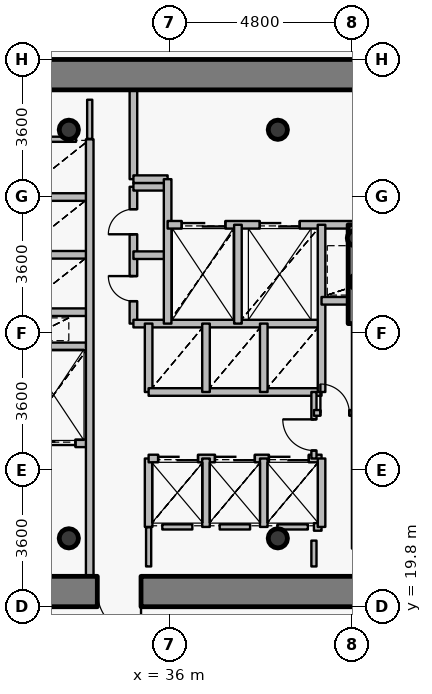
"""IFC4 building model, lengths in metres.
Left out: names, types, materials, properties, quantities, classifications, styles, units other than length and angle.
Written with IfcOpenShell. Run it as: python <this file> out.ifc"""

import sys

from ifc_helpers import new_model, si_unit, direction, frame, frame_2d, origin, origin_2d, place, context, subcontext, project, spatial, rectangle, hollow_circle, extrude, source, transform, mapped, element, fill, save


model = new_model("IFC4")
c1 = context("Model", 3, precision=1e-05, world=origin(), true_north=direction((0.0, 1.0)))
c2 = subcontext(c1, "Body", "Model", "MODEL_VIEW")
j1 = project(units=[si_unit("LENGTHUNIT", "METRE"), si_unit("PLANEANGLEUNIT", "RADIAN")], contexts=[c1])
p1 = place(None, origin())
s1 = spatial("IfcSite", under=j1, at=p1, CompositionType="ELEMENT")
p2 = place(p1, origin())
s2 = spatial("IfcBuilding", under=s1, at=p2, CompositionType="ELEMENT")
p3 = place(p2, frame((0.0, 0.0, 100.95)))
s3 = spatial("IfcBuildingStorey", under=s2, at=p3, CompositionType="ELEMENT", Elevation=100.95)
for number, where, z_axis, x_axis in (
    (1, (33.35, 21.6, 0.0), (0.0, 0.0, 1.0), (1.0, 0.0, 0.0)),
    (2, (38.85, 21.6, 0.0), (0.0, 0.0, 1.0), (1.0, 0.0, 0.0)),
    (3, (38.85, 32.35, 0.0), (0.0, 0.0, 1.0), (1.0, 0.0, 0.0)),
    (4, (33.35, 32.35, 0.0), (0.0, 0.0, 1.0), (1.0, 0.0, 0.0)),
):
    element("IfcColumn", number, at=place(p3, frame(where, z_axis=z_axis, x_axis=x_axis)), inside=s3, PredefinedType="COLUMN", context=c2, shape_type="SweptSolid", body=[
        extrude(hollow_circle(Radius=0.254, WallThickness=0.02, at=origin_2d()), origin(), (0.0, 0.0, 1.0), 3.75),
    ])
for number, where, z_axis, x_axis in (
    (5, (40.95, 28.35, 0.0), (0.0, 0.0, 1.0), (1.0, 0.0, 0.0)),
    (6, (40.88, 29.5, 0.0), (0.0, 0.0, 1.0), (1.0, 0.0, 0.0)),
):
    element("IfcColumn", number, at=place(p3, frame(where, z_axis=z_axis, x_axis=x_axis)), inside=s3, PredefinedType="COLUMN", context=c2, shape_type="SweptSolid", body=[
        extrude(hollow_circle(Radius=0.203, WallThickness=0.016, at=origin_2d()), origin(), (0.0, 0.0, 1.0), 3.75),
    ])
p4 = place(p3, frame((26.6, 33.8, 0.0), z_axis=(0.0, 0.0, 1.0), x_axis=(1.0, 0.0, 0.0)))
e7 = element("IfcWall", 7, at=p4, inside=s3, PredefinedType="SHEAR", context=c2, shape_type="SweptSolid", body=[
    extrude(rectangle(XDim=18.8, YDim=0.8, at=frame_2d((9.4, 0.0))), origin(), (0.0, 0.0, 1.0), 2.95),
])
p5 = place(p3, frame((45.4, 20.2, 0.0), z_axis=(0.0, 0.0, 1.0), x_axis=(-1.0, 0.0, 0.0)))
e8 = element("IfcWall", 8, at=p5, inside=s3, PredefinedType="SHEAR", context=c2, shape_type="SweptSolid", body=[
    extrude(rectangle(XDim=18.8, YDim=0.8, at=frame_2d((9.4, 0.0))), origin(), (0.0, 0.0, 1.0), 2.95),
])
p6 = place(p5, frame((10.15, 0.0, 0.0)))
e9 = element("IfcOpeningElement", 9, at=p6, cuts=e8, PredefinedType="OPENING", context=c2, shape_type="SweptSolid", body=[
    extrude(rectangle(XDim=1.15, YDim=2.15, at=origin_2d()), frame((0.575, 0.41, 1.075), z_axis=(0.0, -1.0, 0.0), x_axis=(1.0, 0.0, 0.0)), (0.0, 0.0, 1.0), 0.82),
])
p7 = place(p3, frame((40.9, 27.25, 0.0), z_axis=(0.0, 0.0, 1.0), x_axis=(0.0, 1.0, 0.0)))
e10 = element("IfcWall", 10, at=p7, inside=s3, PredefinedType="SHEAR", context=c2, shape_type="SweptSolid", body=[
    extrude(rectangle(XDim=2.6, YDim=0.4, at=frame_2d((1.3, 0.0))), origin(), (0.0, 0.0, 1.0), 3.1),
])
p8 = place(p3, frame((32.0, 24.1, 0.0), z_axis=(0.0, 0.0, 1.0), x_axis=(1.0, 0.0, 0.0)))
e11 = element("IfcWall", 11, at=p8, inside=s3, PredefinedType="PARTITIONING", context=c2, shape_type="SweptSolid", body=[
    extrude(rectangle(XDim=1.9, YDim=0.2, at=frame_2d((0.95, 0.0))), origin(), (0.0, 0.0, 1.0), 3.085),
])
p9 = place(p8, frame((0.375, 0.0, 0.0)))
e12 = element("IfcOpeningElement", 12, at=p9, cuts=e11, PredefinedType="OPENING", context=c2, shape_type="SweptSolid", body=[
    extrude(rectangle(XDim=1.15, YDim=2.15, at=origin_2d()), frame((0.575, 0.11, 1.075), z_axis=(0.0, -1.0, 0.0), x_axis=(1.0, 0.0, 0.0)), (0.0, 0.0, 1.0), 0.22),
])
for number, where, z_axis, x_axis in (
    (13, (32.0, 26.65, 0.0), (0.0, 0.0, 1.0), (1.0, 0.0, 0.0)),
    (14, (32.0, 27.55, 0.0), (0.0, 0.0, 1.0), (1.0, 0.0, 0.0)),
    (15, (32.0, 29.06, 0.0), (0.0, 0.0, 1.0), (1.0, 0.0, 0.0)),
    (16, (32.0, 30.58, 0.0), (0.0, 0.0, 1.0), (1.0, 0.0, 0.0)),
):
    element("IfcWall", number, at=place(p3, frame(where, z_axis=z_axis, x_axis=x_axis)), inside=s3, PredefinedType="PARTITIONING", context=c2, shape_type="SweptSolid", body=[
        extrude(rectangle(XDim=1.9, YDim=0.2, at=frame_2d((0.95, 0.0))), origin(), (0.0, 0.0, 1.0), 3.085),
    ])
p10 = place(p3, frame((33.9, 20.6, 0.0), z_axis=(0.0, 0.0, 1.0), x_axis=(0.0, 1.0, 0.0)))
e17 = element("IfcWall", 17, at=p10, inside=s3, PredefinedType="PARTITIONING", context=c2, shape_type="SweptSolid", body=[
    extrude(rectangle(XDim=11.5, YDim=0.2, at=frame_2d((5.75, 0.0))), origin(), (0.0, 0.0, 1.0), 3.085),
])
p11 = place(p3, frame((35.05, 27.25, 0.0), z_axis=(0.0, 0.0, 1.0), x_axis=(0.0, 1.0, 0.0)))
e18 = element("IfcWall", 18, at=p11, inside=s3, PredefinedType="PARTITIONING", context=c2, shape_type="SweptSolid", body=[
    extrude(rectangle(XDim=3.6, YDim=0.2, at=frame_2d((1.8, 0.0))), origin(), (0.0, 0.0, 1.0), 3.5),
])
p12 = place(p11, frame((0.59, 0.0, 0.0)))
e19 = element("IfcOpeningElement", 19, at=p12, cuts=e18, PredefinedType="OPENING", context=c2, shape_type="SweptSolid", body=[
    extrude(rectangle(XDim=0.66, YDim=2.05, at=origin_2d()), frame((0.33, 0.11, 1.025), z_axis=(0.0, -1.0, 0.0), x_axis=(1.0, 0.0, 0.0)), (0.0, 0.0, 1.0), 0.22),
])
p13 = place(p11, frame((2.35, 0.0, 0.0)))
e20 = element("IfcOpeningElement", 20, at=p13, cuts=e18, PredefinedType="OPENING", context=c2, shape_type="SweptSolid", body=[
    extrude(rectangle(XDim=0.66, YDim=2.05, at=origin_2d()), frame((0.33, 0.11, 1.025), z_axis=(0.0, -1.0, 0.0), x_axis=(1.0, 0.0, 0.0)), (0.0, 0.0, 1.0), 0.22),
])
p14 = place(p3, frame((35.05, 27.25, 0.0), z_axis=(0.0, 0.0, 1.0), x_axis=(1.0, 0.0, 0.0)))
e21 = element("IfcWall", 21, at=p14, inside=s3, PredefinedType="PARTITIONING", context=c2, shape_type="SweptSolid", body=[
    extrude(rectangle(XDim=4.95, YDim=0.2, at=frame_2d((2.475, 0.0))), origin(), (0.0, 0.0, 1.0), 3.085),
])
for number, where, z_axis, x_axis in (
    (22, (35.05, 29.05, 0.0), (0.0, 0.0, 1.0), (1.0, 0.0, 0.0)),
    (23, (35.05, 30.85, 0.0), (0.0, 0.0, 1.0), (1.0, 0.0, 0.0)),
):
    element("IfcWall", number, at=place(p3, frame(where, z_axis=z_axis, x_axis=x_axis)), inside=s3, PredefinedType="PARTITIONING", context=c2, shape_type="SweptSolid", body=[
        extrude(rectangle(XDim=0.9, YDim=0.2, at=frame_2d((0.45, 0.0))), origin(), (0.0, 0.0, 1.0), 3.5),
    ])
p15 = place(p3, frame((35.05, 31.05, 0.0), z_axis=(0.0, 0.0, 1.0), x_axis=(0.0, 1.0, 0.0)))
e24 = element("IfcWall", 24, at=p15, inside=s3, PredefinedType="PARTITIONING", context=c2, shape_type="SweptSolid", body=[
    extrude(rectangle(XDim=2.35, YDim=0.2, at=frame_2d((1.175, 0.0))), origin(), (0.0, 0.0, 1.0), 3.085),
])
p16 = place(p3, frame((35.05, 31.05, 0.0), z_axis=(0.0, 0.0, 1.0), x_axis=(1.0, 0.0, 0.0)))
e25 = element("IfcWall", 25, at=p16, inside=s3, PredefinedType="PARTITIONING", context=c2, shape_type="SweptSolid", body=[
    extrude(rectangle(XDim=0.9, YDim=0.2, at=frame_2d((0.45, 0.0))), origin(), (0.0, 0.0, 1.0), 3.5),
])
p17 = place(p3, frame((35.45, 21.9, 0.0), z_axis=(0.0, 0.0, 1.0), x_axis=(0.0, 1.0, 0.0)))
e26 = element("IfcWall", 26, at=p17, inside=s3, PredefinedType="PARTITIONING", context=c2, shape_type="SweptSolid", body=[
    extrude(rectangle(XDim=1.8, YDim=0.2, at=frame_2d((0.9, 0.0))), origin(), (0.0, 0.0, 1.0), 3.5),
])
p18 = place(p3, frame((35.45, 23.7, 0.0), z_axis=(0.0, 0.0, 1.0), x_axis=(1.0, 0.0, 0.0)))
e27 = element("IfcWall", 27, at=p18, inside=s3, PredefinedType="PARTITIONING", context=c2, shape_type="SweptSolid", body=[
    extrude(rectangle(XDim=4.55, YDim=0.2, at=frame_2d((2.275, 0.0))), origin(), (0.0, 0.0, 1.0), 3.085),
])
p19 = place(p18, frame((0.25, 0.0, 0.0)))
e28 = element("IfcOpeningElement", 28, at=p19, cuts=e27, PredefinedType="OPENING", context=c2, shape_type="SweptSolid", body=[
    extrude(rectangle(XDim=1.05, YDim=2.15, at=origin_2d()), frame((0.525, 0.11, 1.075), z_axis=(0.0, -1.0, 0.0), x_axis=(1.0, 0.0, 0.0)), (0.0, 0.0, 1.0), 0.22),
])
p20 = place(p18, frame((1.745, 0.0, 0.0)))
e29 = element("IfcOpeningElement", 29, at=p20, cuts=e27, PredefinedType="OPENING", context=c2, shape_type="SweptSolid", body=[
    extrude(rectangle(XDim=1.05, YDim=2.15, at=origin_2d()), frame((0.525, 0.11, 1.075), z_axis=(0.0, -1.0, 0.0), x_axis=(1.0, 0.0, 0.0)), (0.0, 0.0, 1.0), 0.22),
])
p21 = place(p18, frame((3.165, 0.0, 0.0)))
e30 = element("IfcOpeningElement", 30, at=p21, cuts=e27, PredefinedType="OPENING", context=c2, shape_type="SweptSolid", body=[
    extrude(rectangle(XDim=1.05, YDim=2.15, at=origin_2d()), frame((0.525, 0.11, 1.075), z_axis=(0.0, -1.0, 0.0), x_axis=(1.0, 0.0, 0.0)), (0.0, 0.0, 1.0), 0.22),
])
p22 = place(p3, frame((35.45, 25.45, 0.0), z_axis=(0.0, 0.0, 1.0), x_axis=(0.0, 1.0, 0.0)))
e31 = element("IfcWall", 31, at=p22, inside=s3, PredefinedType="PARTITIONING", context=c2, shape_type="SweptSolid", body=[
    extrude(rectangle(XDim=1.8, YDim=0.2, at=frame_2d((0.9, 0.0))), origin(), (0.0, 0.0, 1.0), 3.5),
])
p23 = place(p3, frame((35.45, 25.45, 0.0), z_axis=(0.0, 0.0, 1.0), x_axis=(1.0, 0.0, 0.0)))
e32 = element("IfcWall", 32, at=p23, inside=s3, PredefinedType="PARTITIONING", context=c2, shape_type="SweptSolid", body=[
    extrude(rectangle(XDim=4.55, YDim=0.2, at=frame_2d((2.275, 0.0))), origin(), (0.0, 0.0, 1.0), 3.085),
])
p24 = place(p3, frame((35.95, 27.25, 0.0), z_axis=(0.0, 0.0, 1.0), x_axis=(0.0, 1.0, 0.0)))
e33 = element("IfcWall", 33, at=p24, inside=s3, PredefinedType="PARTITIONING", context=c2, shape_type="SweptSolid", body=[
    extrude(rectangle(XDim=3.8, YDim=0.2, at=frame_2d((1.9, 0.0))), origin(), (0.0, 0.0, 1.0), 3.5),
])
p25 = place(p3, frame((35.95, 29.85, 0.0), z_axis=(0.0, 0.0, 1.0), x_axis=(1.0, 0.0, 0.0)))
e34 = element("IfcWall", 34, at=p25, inside=s3, PredefinedType="PARTITIONING", context=c2, shape_type="SweptSolid", body=[
    extrude(rectangle(XDim=8.49, YDim=0.2, at=frame_2d((4.245, 0.0))), origin(), (0.0, 0.0, 1.0), 3.085),
])
p26 = place(p25, frame((6.1, 0.0, 0.0)))
e35 = element("IfcOpeningElement", 35, at=p26, cuts=e34, PredefinedType="OPENING", context=c2, shape_type="SweptSolid", body=[
    extrude(rectangle(XDim=1.2, YDim=2.15, at=origin_2d()), frame((0.6, 0.11, 1.075), z_axis=(0.0, -1.0, 0.0), x_axis=(1.0, 0.0, 0.0)), (0.0, 0.0, 1.0), 0.22),
])
p27 = place(p25, frame((0.37, 0.0, 0.0)))
e36 = element("IfcOpeningElement", 36, at=p27, cuts=e34, PredefinedType="OPENING", context=c2, shape_type="SweptSolid", body=[
    extrude(rectangle(XDim=1.15, YDim=2.15, at=origin_2d()), frame((0.575, 0.11, 1.075), z_axis=(0.0, -1.0, 0.0), x_axis=(1.0, 0.0, 0.0)), (0.0, 0.0, 1.0), 0.22),
])
p28 = place(p25, frame((2.425, 0.0, 0.0)))
e37 = element("IfcOpeningElement", 37, at=p28, cuts=e34, PredefinedType="OPENING", context=c2, shape_type="SweptSolid", body=[
    extrude(rectangle(XDim=1.05, YDim=2.15, at=origin_2d()), frame((0.525, 0.11, 1.075), z_axis=(0.0, -1.0, 0.0), x_axis=(1.0, 0.0, 0.0)), (0.0, 0.0, 1.0), 0.22),
])
for number, where, z_axis, x_axis in (
    (38, (36.96, 21.9, 0.0), (0.0, 0.0, 1.0), (0.0, 1.0, 0.0)),
    (39, (36.96, 25.45, 0.0), (0.0, 0.0, 1.0), (0.0, 1.0, 0.0)),
):
    element("IfcWall", number, at=place(p3, frame(where, z_axis=z_axis, x_axis=x_axis)), inside=s3, PredefinedType="PARTITIONING", context=c2, shape_type="SweptSolid", body=[
        extrude(rectangle(XDim=1.8, YDim=0.2, at=frame_2d((0.9, 0.0))), origin(), (0.0, 0.0, 1.0), 3.5),
    ])
p29 = place(p3, frame((37.8, 27.25, 0.0), z_axis=(0.0, 0.0, 1.0), x_axis=(0.0, 1.0, 0.0)))
e40 = element("IfcWall", 40, at=p29, inside=s3, PredefinedType="PARTITIONING", context=c2, shape_type="SweptSolid", body=[
    extrude(rectangle(XDim=2.6, YDim=0.2, at=frame_2d((1.3, 0.0))), origin(), (0.0, 0.0, 1.0), 3.5),
])
for number, where, z_axis, x_axis in (
    (41, (38.48, 21.9, 0.0), (0.0, 0.0, 1.0), (0.0, 1.0, 0.0)),
    (42, (38.48, 25.45, 0.0), (0.0, 0.0, 1.0), (0.0, 1.0, 0.0)),
):
    element("IfcWall", number, at=place(p3, frame(where, z_axis=z_axis, x_axis=x_axis)), inside=s3, PredefinedType="PARTITIONING", context=c2, shape_type="SweptSolid", body=[
        extrude(rectangle(XDim=1.8, YDim=0.2, at=frame_2d((0.9, 0.0))), origin(), (0.0, 0.0, 1.0), 3.5),
    ])
p30 = place(p3, frame((39.8, 21.9, 0.0), z_axis=(0.0, 0.0, 1.0), x_axis=(1.0, 0.0, 0.0)))
e43 = element("IfcWall", 43, at=p30, inside=s3, PredefinedType="PARTITIONING", context=c2, shape_type="SweptSolid", body=[
    extrude(rectangle(XDim=0.2, YDim=0.2, at=frame_2d((0.1, 0.0))), origin(), (0.0, 0.0, 1.0), 3.5),
])
p31 = place(p3, frame((39.8, 23.7, 0.0), z_axis=(0.0, 0.0, 1.0), x_axis=(0.0, 1.0, 0.0)))
e44 = element("IfcWall", 44, at=p31, inside=s3, PredefinedType="PARTITIONING", context=c2, shape_type="SweptSolid", body=[
    extrude(rectangle(XDim=1.75, YDim=0.135, at=frame_2d((0.875, 0.0))), origin(), (0.0, 0.0, 1.0), 3.5),
])
p32 = place(p31, frame((0.21, 0.0, 0.0)))
e45 = element("IfcOpeningElement", 45, at=p32, cuts=e44, PredefinedType="OPENING", context=c2, shape_type="SweptSolid", body=[
    extrude(rectangle(XDim=0.82, YDim=2.1, at=origin_2d()), frame((0.41, 0.078, 1.05), z_axis=(0.0, -1.0, 0.0), x_axis=(1.0, 0.0, 0.0)), (0.0, 0.0, 1.0), 0.155),
])
p33 = place(p3, frame((39.8, 24.9, 0.0), z_axis=(0.0, 0.0, 1.0), x_axis=(1.0, 0.0, 0.0)))
e46 = element("IfcWall", 46, at=p33, inside=s3, PredefinedType="PARTITIONING", context=c2, shape_type="SweptSolid", body=[
    extrude(rectangle(XDim=1.1, YDim=0.15, at=frame_2d((0.55, 0.0))), origin(), (0.0, 0.0, 1.0), 3.5),
])
p34 = place(p33, frame((0.17, 0.0, 0.0)))
e47 = element("IfcOpeningElement", 47, at=p34, cuts=e46, PredefinedType="OPENING", context=c2, shape_type="SweptSolid", body=[
    extrude(rectangle(XDim=0.76, YDim=2.1, at=origin_2d()), frame((0.38, 0.085, 1.05), z_axis=(0.0, -1.0, 0.0), x_axis=(1.0, 0.0, 0.0)), (0.0, 0.0, 1.0), 0.17),
])
p35 = place(p3, frame((40.0, 21.9, 0.0), z_axis=(0.0, 0.0, 1.0), x_axis=(0.0, 1.0, 0.0)))
e48 = element("IfcWall", 48, at=p35, inside=s3, PredefinedType="PARTITIONING", context=c2, shape_type="SweptSolid", body=[
    extrude(rectangle(XDim=1.8, YDim=0.2, at=frame_2d((0.9, 0.0))), origin(), (0.0, 0.0, 1.0), 3.5),
])
p36 = place(p3, frame((40.0, 25.45, 0.0), z_axis=(0.0, 0.0, 1.0), x_axis=(0.0, 1.0, 0.0)))
e49 = element("IfcWall", 49, at=p36, inside=s3, PredefinedType="PARTITIONING", context=c2, shape_type="SweptSolid", body=[
    extrude(rectangle(XDim=4.4, YDim=0.2, at=frame_2d((2.2, 0.0))), origin(), (0.0, 0.0, 1.0), 3.5),
])
p37 = place(p3, frame((40.0, 27.85, 0.0), z_axis=(0.0, 0.0, 1.0), x_axis=(1.0, 0.0, 0.0)))
e50 = element("IfcWall", 50, at=p37, inside=s3, PredefinedType="PARTITIONING", context=c2, shape_type="SweptSolid", body=[
    extrude(rectangle(XDim=0.9, YDim=0.2, at=frame_2d((0.45, 0.0))), origin(), (0.0, 0.0, 1.0), 3.5),
])
p38 = place(p3, frame((40.9, 21.33, 0.0), z_axis=(0.0, 0.0, 1.0), x_axis=(0.0, 1.0, 0.0)))
e51 = element("IfcWall", 51, at=p38, inside=s3, PredefinedType="PARTITIONING", context=c2, shape_type="SweptSolid", body=[
    extrude(rectangle(XDim=5.91, YDim=0.2, at=frame_2d((2.955, 0.0))), origin(), (0.0, 0.0, 1.0), 3.035),
])
p39 = place(p3, frame((36.6, 21.9, 0.0), z_axis=(0.0, 0.0, 1.0), x_axis=(-1.0, 0.0, 0.0)))
e52 = element("IfcWall", 52, at=p39, inside=s3, PredefinedType="PARTITIONING", context=c2, shape_type="SweptSolid", body=[
    extrude(rectangle(XDim=0.79, YDim=0.135, at=frame_2d((0.395, 0.0))), origin(), (0.0, 0.0, 1.0), 3.5),
])
p40 = place(p3, frame((38.12, 21.9, 0.0), z_axis=(0.0, 0.0, 1.0), x_axis=(-1.0, 0.0, 0.0)))
e53 = element("IfcWall", 53, at=p40, inside=s3, PredefinedType="PARTITIONING", context=c2, shape_type="SweptSolid", body=[
    extrude(rectangle(XDim=0.8, YDim=0.135, at=frame_2d((0.4, 0.0))), origin(), (0.0, 0.0, 1.0), 3.5),
])
p41 = place(p3, frame((39.64, 21.9, 0.0), z_axis=(0.0, 0.0, 1.0), x_axis=(-1.0, 0.0, 0.0)))
e54 = element("IfcWall", 54, at=p41, inside=s3, PredefinedType="PARTITIONING", context=c2, shape_type="SweptSolid", body=[
    extrude(rectangle(XDim=0.8, YDim=0.135, at=frame_2d((0.4, 0.0))), origin(), (0.0, 0.0, 1.0), 3.085),
])
p42 = place(p3, frame((32.36, 32.1, 0.0), z_axis=(0.0, 0.0, 1.0), x_axis=(1.0, 0.0, 0.0)))
e55 = element("IfcWall", 55, at=p42, inside=s3, PredefinedType="PARTITIONING", context=c2, shape_type="SweptSolid", body=[
    extrude(rectangle(XDim=1.18, YDim=0.135, at=frame_2d((0.59, 0.0))), origin(), (0.0, 0.0, 1.0), 3.085),
])
p43 = place(p3, frame((39.8, 20.86, 0.0), z_axis=(0.0, 0.0, 1.0), x_axis=(0.0, 1.0, 0.0)))
e56 = element("IfcWall", 56, at=p43, inside=s3, PredefinedType="PARTITIONING", context=c2, shape_type="SweptSolid", body=[
    extrude(rectangle(XDim=0.68, YDim=0.135, at=frame_2d((0.34, 0.0))), origin(), (0.0, 0.0, 1.0), 3.035),
])
for number, where, z_axis, x_axis in (
    (57, (35.45, 21.89, 0.0), (0.0, 0.0, 1.0), (0.0, -1.0, 0.0)),
    (58, (33.9, 32.11, 0.0), (0.0, 0.0, 1.0), (0.0, 1.0, 0.0)),
):
    element("IfcWall", number, at=place(p3, frame(where, z_axis=z_axis, x_axis=x_axis)), inside=s3, PredefinedType="PARTITIONING", context=c2, shape_type="SweptSolid", body=[
        extrude(rectangle(XDim=1.03, YDim=0.135, at=frame_2d((0.515, 0.0))), origin(), (0.0, 0.0, 1.0), 3.085),
    ])
m1 = source(origin(), c2, "Body", "SweptSolid", [
    extrude(rectangle(XDim=1.15, YDim=2.15, at=origin_2d()), frame((0.575, 0.025, 1.075), z_axis=(0.0, -1.0, 0.0), x_axis=(1.0, 0.0, 0.0)), (0.0, 0.0, 1.0), 0.05),
])
p44 = place(p6, origin())
e59 = element("IfcDoor", 59, at=p44, inside=s3, OperationType="SINGLE_SWING_LEFT", PredefinedType="DOOR", context=c2, shape_type="MappedRepresentation", body=[
    mapped(m1, transform((0.0, 0.0, 0.0), x_axis=(1.0, 0.0, 0.0), y_axis=(0.0, 1.0, 0.0), z_axis=(0.0, 0.0, 1.0), scale=1.0)),
])
fill(e9, e59)
m2 = source(origin(), c2, "Body", "SweptSolid", [
    extrude(rectangle(XDim=1.15, YDim=2.15, at=origin_2d()), frame((0.575, 0.025, 1.075), z_axis=(0.0, -1.0, 0.0), x_axis=(1.0, 0.0, 0.0)), (0.0, 0.0, 1.0), 0.05),
])
p45 = place(p27, origin())
e60 = element("IfcDoor", 60, at=p45, inside=s3, OperationType="DOUBLE_DOOR_SLIDING", PredefinedType="USERDEFINED", context=c2, shape_type="MappedRepresentation", body=[
    mapped(m2, transform((0.0, 0.0, 0.0), x_axis=(1.0, 0.0, 0.0), y_axis=(0.0, 1.0, 0.0), z_axis=(0.0, 0.0, 1.0), scale=1.0)),
])
fill(e36, e60)
p46 = place(p9, origin())
e61 = element("IfcDoor", 61, at=p46, inside=s3, OperationType="DOUBLE_DOOR_SLIDING", PredefinedType="USERDEFINED", context=c2, shape_type="MappedRepresentation", body=[
    mapped(m2, transform((0.0, 0.0, 0.0), x_axis=(1.0, 0.0, 0.0), y_axis=(0.0, 1.0, 0.0), z_axis=(0.0, 0.0, 1.0), scale=1.0)),
])
fill(e12, e61)
m3 = source(origin(), c2, "Body", "SweptSolid", [
    extrude(rectangle(XDim=1.05, YDim=2.15, at=origin_2d()), frame((0.525, 0.025, 1.075), z_axis=(0.0, -1.0, 0.0), x_axis=(1.0, 0.0, 0.0)), (0.0, 0.0, 1.0), 0.05),
])
p47 = place(p28, origin())
e62 = element("IfcDoor", 62, at=p47, inside=s3, OperationType="DOUBLE_DOOR_SLIDING", PredefinedType="USERDEFINED", context=c2, shape_type="MappedRepresentation", body=[
    mapped(m3, transform((0.0, 0.0, 0.0), x_axis=(1.0, 0.0, 0.0), y_axis=(0.0, 1.0, 0.0), z_axis=(0.0, 0.0, 1.0), scale=1.0)),
])
fill(e37, e62)
p48 = place(p19, origin())
e63 = element("IfcDoor", 63, at=p48, inside=s3, OperationType="DOUBLE_DOOR_SLIDING", PredefinedType="USERDEFINED", context=c2, shape_type="MappedRepresentation", body=[
    mapped(m3, transform((0.0, 0.0, 0.0), x_axis=(1.0, 0.0, 0.0), y_axis=(0.0, 1.0, 0.0), z_axis=(0.0, 0.0, 1.0), scale=1.0)),
])
fill(e28, e63)
p49 = place(p20, origin())
e64 = element("IfcDoor", 64, at=p49, inside=s3, OperationType="DOUBLE_DOOR_SLIDING", PredefinedType="USERDEFINED", context=c2, shape_type="MappedRepresentation", body=[
    mapped(m3, transform((0.0, 0.0, 0.0), x_axis=(1.0, 0.0, 0.0), y_axis=(0.0, 1.0, 0.0), z_axis=(0.0, 0.0, 1.0), scale=1.0)),
])
fill(e29, e64)
p50 = place(p21, origin())
e65 = element("IfcDoor", 65, at=p50, inside=s3, OperationType="DOUBLE_DOOR_SLIDING", PredefinedType="USERDEFINED", context=c2, shape_type="MappedRepresentation", body=[
    mapped(m3, transform((0.0, 0.0, 0.0), x_axis=(1.0, 0.0, 0.0), y_axis=(0.0, 1.0, 0.0), z_axis=(0.0, 0.0, 1.0), scale=1.0)),
])
fill(e30, e65)
m4 = source(origin(), c2, "Body", "SweptSolid", [
    extrude(rectangle(XDim=0.66, YDim=2.05, at=origin_2d()), frame((0.33, 0.025, 1.025), z_axis=(0.0, -1.0, 0.0), x_axis=(1.0, 0.0, 0.0)), (0.0, 0.0, 1.0), 0.05),
])
p51 = place(p12, origin())
e66 = element("IfcDoor", 66, at=p51, inside=s3, OperationType="SINGLE_SWING_RIGHT", PredefinedType="USERDEFINED", context=c2, shape_type="MappedRepresentation", body=[
    mapped(m4, transform((0.0, 0.0, 0.0), x_axis=(1.0, 0.0, 0.0), y_axis=(0.0, 1.0, 0.0), z_axis=(0.0, 0.0, 1.0), scale=1.0)),
])
fill(e19, e66)
p52 = place(p13, origin())
e67 = element("IfcDoor", 67, at=p52, inside=s3, OperationType="SINGLE_SWING_LEFT", PredefinedType="USERDEFINED", context=c2, shape_type="MappedRepresentation", body=[
    mapped(m4, transform((0.0, 0.0, 0.0), x_axis=(1.0, 0.0, 0.0), y_axis=(0.0, 1.0, 0.0), z_axis=(0.0, 0.0, 1.0), scale=1.0)),
])
fill(e20, e67)
m5 = source(origin(), c2, "Body", "SweptSolid", [
    extrude(rectangle(XDim=0.82, YDim=2.1, at=origin_2d()), frame((0.41, 0.025, 1.05), z_axis=(0.0, -1.0, 0.0), x_axis=(1.0, 0.0, 0.0)), (0.0, 0.0, 1.0), 0.05),
])
p53 = place(p32, origin())
e68 = element("IfcDoor", 68, at=p53, inside=s3, OperationType="SINGLE_SWING_RIGHT", PredefinedType="DOOR", context=c2, shape_type="MappedRepresentation", body=[
    mapped(m5, transform((0.0, 0.0, 0.0), x_axis=(1.0, 0.0, 0.0), y_axis=(0.0, 1.0, 0.0), z_axis=(0.0, 0.0, 1.0), scale=1.0)),
])
fill(e45, e68)
m6 = source(origin(), c2, "Body", "SweptSolid", [
    extrude(rectangle(XDim=0.76, YDim=2.1, at=origin_2d()), frame((0.38, 0.025, 1.05), z_axis=(0.0, -1.0, 0.0), x_axis=(1.0, 0.0, 0.0)), (0.0, 0.0, 1.0), 0.05),
])
p54 = place(p34, origin())
e69 = element("IfcDoor", 69, at=p54, inside=s3, OperationType="SINGLE_SWING_LEFT", PredefinedType="DOOR", context=c2, shape_type="MappedRepresentation", body=[
    mapped(m6, transform((0.0, 0.0, 0.0), x_axis=(1.0, 0.0, 0.0), y_axis=(0.0, 1.0, 0.0), z_axis=(0.0, 0.0, 1.0), scale=1.0)),
])
fill(e47, e69)
save(model, sys.argv[1])
